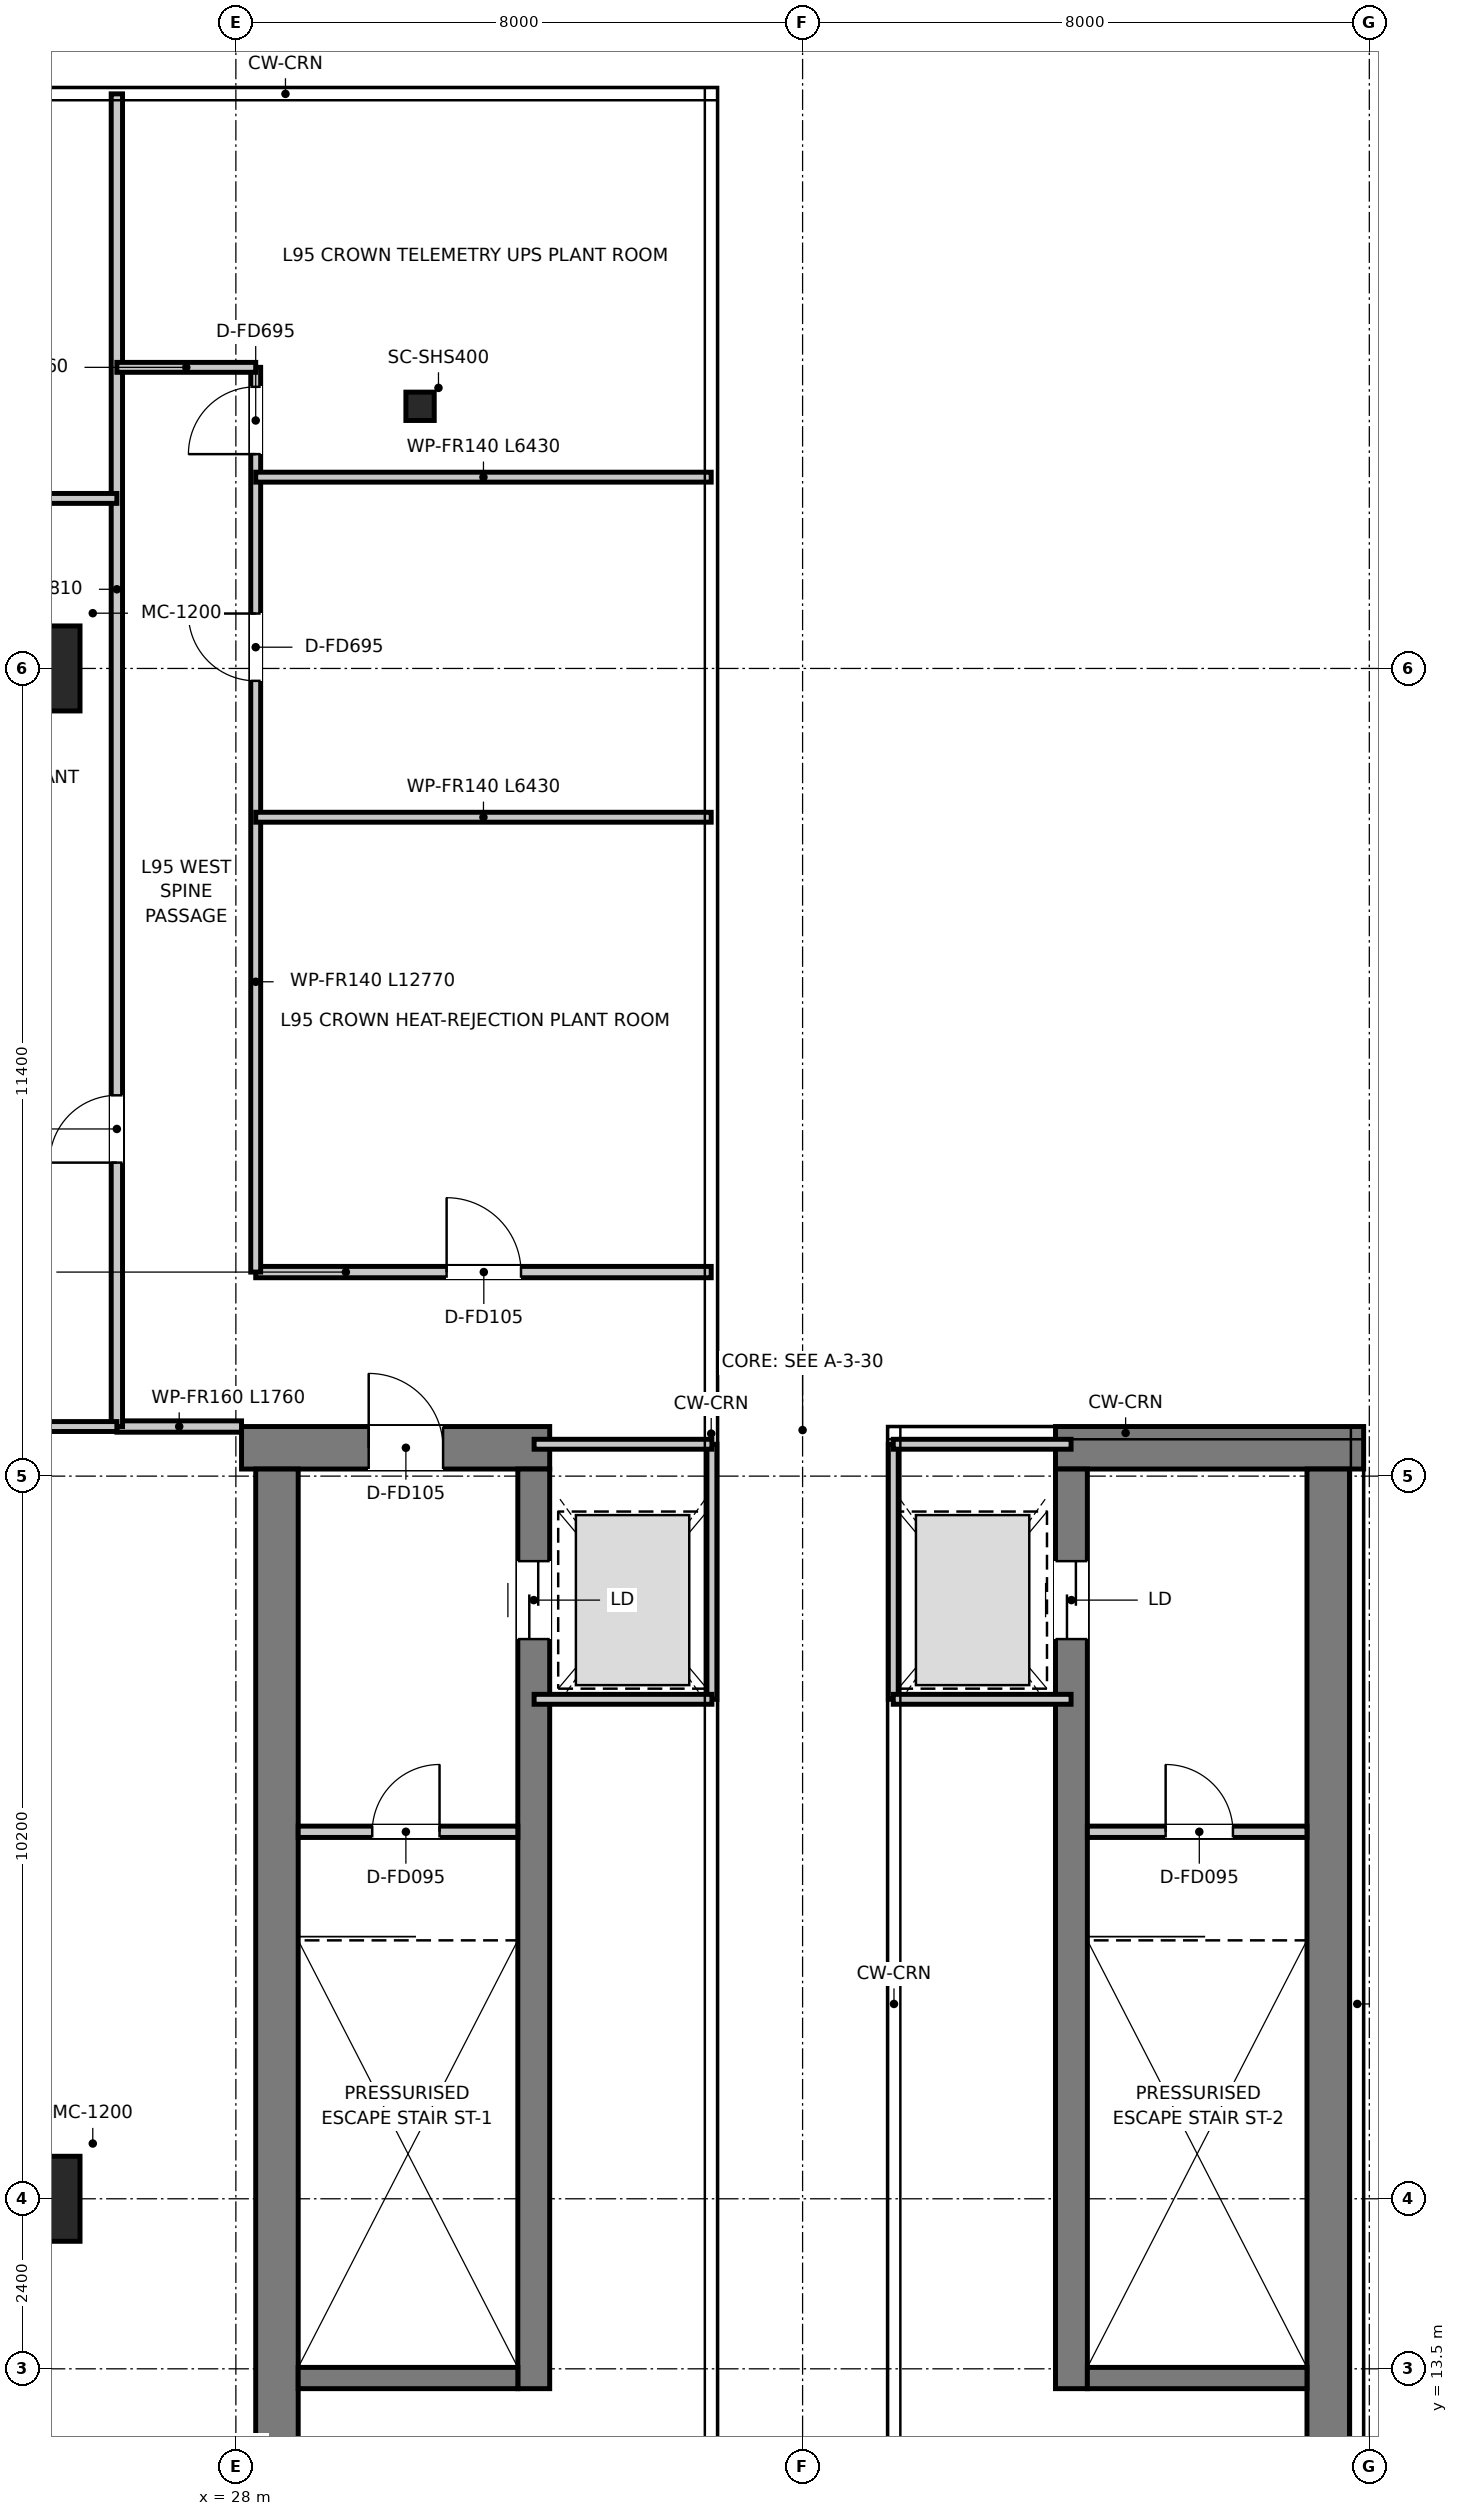
"""IFC4 building model, lengths in metres.
Left out: names, types, materials, properties, quantities, classifications, styles, units other than length and angle.
Written with IfcOpenShell. Run it as: python <this file> out.ifc"""

import sys

from ifc_helpers import new_model, si_unit, direction, frame, frame_2d, origin, origin_2d, place, context, subcontext, project, spatial, rectangle, hollow_rectangle, extrude, source, transform, mapped, element, fill, save


model = new_model("IFC4")
c1 = context("Model", 3, precision=1e-05, world=origin(), true_north=direction((0.0, 1.0)))
c2 = subcontext(c1, "Body", "Model", "MODEL_VIEW")
j1 = project(units=[si_unit("LENGTHUNIT", "METRE"), si_unit("PLANEANGLEUNIT", "RADIAN")], contexts=[c1])
p1 = place(None, origin())
s1 = spatial("IfcSite", under=j1, at=p1, CompositionType="ELEMENT")
p2 = place(p1, origin())
s2 = spatial("IfcBuilding", under=s1, at=p2, CompositionType="ELEMENT")
p3 = place(p2, frame((0.0, 0.0, 385.45)))
s3 = spatial("IfcBuildingStorey", under=s2, at=p3, CompositionType="ELEMENT", Elevation=385.45)
p4 = place(p3, frame((28.08, 26.5, 0.0), z_axis=(0.0, 0.0, 1.0), x_axis=(1.0, 0.0, 0.0)))
e1 = element("IfcWall", 1, at=p4, inside=s3, PredefinedType="SHEAR", context=c2, shape_type="SweptSolid", body=[
    extrude(rectangle(XDim=4.35, YDim=0.6, at=frame_2d((2.175, 0.0))), origin(), (0.0, 0.0, 1.0), 3.55),
])
p5 = place(p4, frame((1.795, 0.0, 0.0)))
e2 = element("IfcOpeningElement", 2, at=p5, cuts=e1, PredefinedType="OPENING", context=c2, shape_type="SweptSolid", body=[
    extrude(rectangle(XDim=1.05, YDim=2.1, at=frame_2d((0.525, 1.05))), frame((0.0, 0.31, 0.0), z_axis=(0.0, -1.0, 0.0), x_axis=(1.0, 0.0, 0.0)), (0.0, 0.0, 1.0), 0.62),
])
p6 = place(p3, frame((28.58, 11.1, 0.0), z_axis=(0.0, 0.0, 1.0), x_axis=(0.0, 1.0, 0.0)))
e3 = element("IfcWall", 3, at=p6, inside=s3, PredefinedType="SHEAR", context=c2, shape_type="SweptSolid", body=[
    extrude(rectangle(XDim=15.1, YDim=0.6, at=frame_2d((7.55, 0.0))), origin(), (0.0, 0.0, 1.0), 3.55),
])
p7 = place(p3, frame((32.205, 13.22, 0.0), z_axis=(0.0, 0.0, 1.0), x_axis=(0.0, 1.0, 0.0)))
e4 = element("IfcWall", 4, at=p7, inside=s3, PredefinedType="SHEAR", context=c2, shape_type="SweptSolid", body=[
    extrude(rectangle(XDim=12.98, YDim=0.45, at=frame_2d((6.49, 0.0))), origin(), (0.0, 0.0, 1.0), 3.55),
])
p8 = place(p7, frame((10.58, 0.0, 0.0)))
e5 = element("IfcOpeningElement", 5, at=p8, cuts=e4, PredefinedType="OPENING", context=c2, shape_type="SweptSolid", body=[
    extrude(rectangle(XDim=1.1, YDim=2.15, at=frame_2d((0.55, 1.075))), frame((0.0, 0.235, 0.0), z_axis=(0.0, -1.0, 0.0), x_axis=(1.0, 0.0, 0.0)), (0.0, 0.0, 1.0), 0.47),
])
p9 = place(p3, frame((28.88, 13.37, 0.0), z_axis=(0.0, 0.0, 1.0), x_axis=(1.0, 0.0, 0.0)))
e6 = element("IfcWall", 6, at=p9, inside=s3, PredefinedType="SHEAR", context=c2, shape_type="SweptSolid", body=[
    extrude(rectangle(XDim=3.1, YDim=0.3, at=frame_2d((1.55, 0.0))), origin(), (0.0, 0.0, 1.0), 3.55),
])
p10 = place(p3, frame((39.57, 26.5, 0.0), z_axis=(0.0, 0.0, 1.0), x_axis=(1.0, 0.0, 0.0)))
e7 = element("IfcWall", 7, at=p10, inside=s3, PredefinedType="SHEAR", context=c2, shape_type="SweptSolid", body=[
    extrude(rectangle(XDim=4.35, YDim=0.6, at=frame_2d((2.175, 0.0))), origin(), (0.0, 0.0, 1.0), 3.55),
])
p11 = place(p3, frame((39.795, 13.22, 0.0), z_axis=(0.0, 0.0, 1.0), x_axis=(0.0, 1.0, 0.0)))
e8 = element("IfcWall", 8, at=p11, inside=s3, PredefinedType="SHEAR", context=c2, shape_type="SweptSolid", body=[
    extrude(rectangle(XDim=12.98, YDim=0.45, at=frame_2d((6.49, 0.0))), origin(), (0.0, 0.0, 1.0), 3.55),
])
p12 = place(p11, frame((10.58, 0.0, 0.0)))
e9 = element("IfcOpeningElement", 9, at=p12, cuts=e8, PredefinedType="OPENING", context=c2, shape_type="SweptSolid", body=[
    extrude(rectangle(XDim=1.1, YDim=2.15, at=frame_2d((0.55, 1.075))), frame((0.0, 0.235, 0.0), z_axis=(0.0, -1.0, 0.0), x_axis=(1.0, 0.0, 0.0)), (0.0, 0.0, 1.0), 0.47),
])
p13 = place(p3, frame((43.42, 11.1, 0.0), z_axis=(0.0, 0.0, 1.0), x_axis=(0.0, 1.0, 0.0)))
e10 = element("IfcWall", 10, at=p13, inside=s3, PredefinedType="SHEAR", context=c2, shape_type="SweptSolid", body=[
    extrude(rectangle(XDim=15.1, YDim=0.6, at=frame_2d((7.55, 0.0))), origin(), (0.0, 0.0, 1.0), 3.55),
])
p14 = place(p3, frame((40.02, 13.37, 0.0), z_axis=(0.0, 0.0, 1.0), x_axis=(1.0, 0.0, 0.0)))
e11 = element("IfcWall", 11, at=p14, inside=s3, PredefinedType="SHEAR", context=c2, shape_type="SweptSolid", body=[
    extrude(rectangle(XDim=3.1, YDim=0.3, at=frame_2d((1.55, 0.0))), origin(), (0.0, 0.0, 1.0), 3.55),
])
m1 = source(origin(), c2, "Body", "SweptSolid", [
    extrude(rectangle(XDim=1.2, YDim=1.2, at=origin_2d()), origin(), (0.0, 0.0, 1.0), 3.55),
])
for number, where, z_axis, x_axis in (
    (12, (25.2, 15.9, 0.0), (0.0, 0.0, 1.0), (1.0, 0.0, 0.0)),
    (13, (25.2, 37.5, 0.0), (0.0, 0.0, 1.0), (1.0, 0.0, 0.0)),
):
    element("IfcColumn", number, at=place(p3, frame(where, z_axis=z_axis, x_axis=x_axis)), inside=s3, PredefinedType="USERDEFINED", context=c2, shape_type="MappedRepresentation", body=[
        mapped(m1, transform((0.0, 0.0, 0.0), x_axis=(1.0, 0.0, 0.0), y_axis=(0.0, 1.0, 0.0), z_axis=(0.0, 0.0, 1.0), scale=1.0)),
    ])
m2 = source(origin(), c2, "Body", "SweptSolid", [
    extrude(hollow_rectangle(XDim=0.4, YDim=0.4, WallThickness=0.025, at=origin_2d()), origin(), (0.0, 0.0, 1.0), 3.55),
])
p15 = place(p3, frame((30.6, 41.2, 0.0), z_axis=(0.0, 0.0, 1.0), x_axis=(1.0, 0.0, 0.0)))
e14 = element("IfcColumn", 14, at=p15, inside=s3, PredefinedType="COLUMN", context=c2, shape_type="MappedRepresentation", body=[
    mapped(m2, transform((0.0, 0.0, 0.0), x_axis=(1.0, 0.0, 0.0), y_axis=(0.0, 1.0, 0.0), z_axis=(0.0, 0.0, 1.0), scale=1.0)),
])
p16 = place(p3, frame((28.88, 21.08, 0.0), z_axis=(0.0, 0.0, 1.0), x_axis=(1.0, 0.0, 0.0)))
e15 = element("IfcWall", 15, at=p16, inside=s3, PredefinedType="PARTITIONING", context=c2, shape_type="SweptSolid", body=[
    extrude(rectangle(XDim=3.1, YDim=0.16, at=frame_2d((1.55, 0.0))), origin(), (0.0, 0.0, 1.0), 3.25),
])
p17 = place(p16, frame((1.045, 0.0, 0.0)))
e16 = element("IfcOpeningElement", 16, at=p17, cuts=e15, PredefinedType="OPENING", context=c2, shape_type="SweptSolid", body=[
    extrude(rectangle(XDim=0.95, YDim=2.1, at=frame_2d((0.475, 1.05))), frame((0.0, 0.09, 0.0), z_axis=(0.0, -1.0, 0.0), x_axis=(1.0, 0.0, 0.0)), (0.0, 0.0, 1.0), 0.18),
])
p18 = place(p3, frame((34.72, 22.95, 0.0), z_axis=(0.0, 0.0, 1.0), x_axis=(0.0, 1.0, 0.0)))
e17 = element("IfcWall", 17, at=p18, inside=s3, PredefinedType="PARTITIONING", context=c2, shape_type="SweptSolid", body=[
    extrude(rectangle(XDim=3.6, YDim=0.14, at=frame_2d((1.8, 0.0))), origin(), (0.0, 0.0, 1.0), 3.25),
])
for number, where, z_axis, x_axis in (
    (18, (32.21, 22.95, 0.0), (0.0, 0.0, 1.0), (1.0, 0.0, 0.0)),
    (19, (32.21, 26.55, 0.0), (0.0, 0.0, 1.0), (1.0, 0.0, 0.0)),
):
    element("IfcWall", number, at=place(p3, frame(where, z_axis=z_axis, x_axis=x_axis)), inside=s3, PredefinedType="PARTITIONING", context=c2, shape_type="SweptSolid", body=[
        extrude(rectangle(XDim=2.51, YDim=0.14, at=frame_2d((1.255, 0.0))), origin(), (0.0, 0.0, 1.0), 3.25),
    ])
p19 = place(p3, frame((40.02, 21.08, 0.0), z_axis=(0.0, 0.0, 1.0), x_axis=(1.0, 0.0, 0.0)))
e20 = element("IfcWall", 20, at=p19, inside=s3, PredefinedType="PARTITIONING", context=c2, shape_type="SweptSolid", body=[
    extrude(rectangle(XDim=3.1, YDim=0.16, at=frame_2d((1.55, 0.0))), origin(), (0.0, 0.0, 1.0), 3.25),
])
p20 = place(p19, frame((1.105, 0.0, 0.0)))
e21 = element("IfcOpeningElement", 21, at=p20, cuts=e20, PredefinedType="OPENING", context=c2, shape_type="SweptSolid", body=[
    extrude(rectangle(XDim=0.95, YDim=2.1, at=frame_2d((0.475, 1.05))), frame((0.0, 0.09, 0.0), z_axis=(0.0, -1.0, 0.0), x_axis=(1.0, 0.0, 0.0)), (0.0, 0.0, 1.0), 0.18),
])
p21 = place(p3, frame((37.28, 22.95, 0.0), z_axis=(0.0, 0.0, 1.0), x_axis=(0.0, 1.0, 0.0)))
e22 = element("IfcWall", 22, at=p21, inside=s3, PredefinedType="PARTITIONING", context=c2, shape_type="SweptSolid", body=[
    extrude(rectangle(XDim=3.6, YDim=0.14, at=frame_2d((1.8, 0.0))), origin(), (0.0, 0.0, 1.0), 3.25),
])
for number, where, z_axis, x_axis in (
    (23, (37.28, 22.95, 0.0), (0.0, 0.0, 1.0), (1.0, 0.0, 0.0)),
    (24, (37.28, 26.55, 0.0), (0.0, 0.0, 1.0), (1.0, 0.0, 0.0)),
):
    element("IfcWall", number, at=place(p3, frame(where, z_axis=z_axis, x_axis=x_axis)), inside=s3, PredefinedType="PARTITIONING", context=c2, shape_type="SweptSolid", body=[
        extrude(rectangle(XDim=2.51, YDim=0.14, at=frame_2d((1.255, 0.0))), origin(), (0.0, 0.0, 1.0), 3.25),
    ])
p22 = place(p3, frame((28.28, 28.98, 0.0), z_axis=(0.0, 0.0, 1.0), x_axis=(1.0, 0.0, 0.0)))
e25 = element("IfcWall", 25, at=p22, inside=s3, PredefinedType="PARTITIONING", context=c2, shape_type="SweptSolid", body=[
    extrude(rectangle(XDim=6.43, YDim=0.16, at=frame_2d((3.215, 0.0))), origin(), (0.0, 0.0, 1.0), 2.76),
])
p23 = place(p22, frame((2.695, 0.0, 0.0)))
e26 = element("IfcOpeningElement", 26, at=p23, cuts=e25, PredefinedType="OPENING", context=c2, shape_type="SweptSolid", body=[
    extrude(rectangle(XDim=1.05, YDim=2.1, at=frame_2d((0.525, 1.05))), frame((0.0, 0.09, 0.0), z_axis=(0.0, -1.0, 0.0), x_axis=(1.0, 0.0, 0.0)), (0.0, 0.0, 1.0), 0.18),
])
p24 = place(p3, frame((26.32, 26.8, 0.0), z_axis=(0.0, 0.0, 1.0), x_axis=(1.0, 0.0, 0.0)))
e27 = element("IfcWall", 27, at=p24, inside=s3, PredefinedType="PARTITIONING", context=c2, shape_type="SweptSolid", body=[
    extrude(rectangle(XDim=1.76, YDim=0.16, at=frame_2d((0.88, 0.0))), origin(), (0.0, 0.0, 1.0), 3.25),
])
p25 = place(p3, frame((26.32, 26.8, 0.0), z_axis=(0.0, 0.0, 1.0), x_axis=(0.0, 1.0, 0.0)))
e28 = element("IfcWall", 28, at=p25, inside=s3, PredefinedType="PARTITIONING", context=c2, shape_type="SweptSolid", body=[
    extrude(rectangle(XDim=18.81, YDim=0.16, at=frame_2d((9.405, 0.0))), origin(), (0.0, 0.0, 1.0), 2.76),
])
p26 = place(p25, frame((3.725, 0.0, 0.0)))
e29 = element("IfcOpeningElement", 29, at=p26, cuts=e28, PredefinedType="OPENING", context=c2, shape_type="SweptSolid", body=[
    extrude(rectangle(XDim=0.95, YDim=2.1, at=frame_2d((0.475, 1.05))), frame((0.0, 0.09, 0.0), z_axis=(0.0, -1.0, 0.0), x_axis=(1.0, 0.0, 0.0)), (0.0, 0.0, 1.0), 0.18),
])
p27 = place(p3, frame((21.45, 26.8, 0.0), z_axis=(0.0, 0.0, 1.0), x_axis=(1.0, 0.0, 0.0)))
e30 = element("IfcWall", 30, at=p27, inside=s3, PredefinedType="PARTITIONING", context=c2, shape_type="SweptSolid", body=[
    extrude(rectangle(XDim=4.87, YDim=0.14, at=frame_2d((2.435, 0.0))), origin(), (0.0, 0.0, 1.0), 2.76),
])
p28 = place(p3, frame((21.45, 39.9, 0.0), z_axis=(0.0, 0.0, 1.0), x_axis=(1.0, 0.0, 0.0)))
e31 = element("IfcWall", 31, at=p28, inside=s3, PredefinedType="PARTITIONING", context=c2, shape_type="SweptSolid", body=[
    extrude(rectangle(XDim=4.87, YDim=0.14, at=frame_2d((2.435, 0.0))), origin(), (0.0, 0.0, 1.0), 3.25),
])
p29 = place(p3, frame((28.28, 28.98, 0.0), z_axis=(0.0, 0.0, 1.0), x_axis=(0.0, 1.0, 0.0)))
e32 = element("IfcWall", 32, at=p29, inside=s3, PredefinedType="PARTITIONING", context=c2, shape_type="SweptSolid", body=[
    extrude(rectangle(XDim=12.77, YDim=0.14, at=frame_2d((6.385, 0.0))), origin(), (0.0, 0.0, 1.0), 2.76),
])
p30 = place(p29, frame((8.345, 0.0, 0.0)))
e33 = element("IfcOpeningElement", 33, at=p30, cuts=e32, PredefinedType="OPENING", context=c2, shape_type="SweptSolid", body=[
    extrude(rectangle(XDim=0.95, YDim=2.1, at=frame_2d((0.475, 1.05))), frame((0.0, 0.08, 0.0), z_axis=(0.0, -1.0, 0.0), x_axis=(1.0, 0.0, 0.0)), (0.0, 0.0, 1.0), 0.16),
])
p31 = place(p29, frame((11.545, 0.0, 0.0)))
e34 = element("IfcOpeningElement", 34, at=p31, cuts=e32, PredefinedType="OPENING", context=c2, shape_type="SweptSolid", body=[
    extrude(rectangle(XDim=0.95, YDim=2.1, at=frame_2d((0.475, 1.05))), frame((0.0, 0.08, 0.0), z_axis=(0.0, -1.0, 0.0), x_axis=(1.0, 0.0, 0.0)), (0.0, 0.0, 1.0), 0.16),
])
for number, where, z_axis, x_axis in (
    (35, (28.28, 35.4, 0.0), (0.0, 0.0, 1.0), (1.0, 0.0, 0.0)),
    (36, (28.28, 40.2, 0.0), (0.0, 0.0, 1.0), (1.0, 0.0, 0.0)),
):
    element("IfcWall", number, at=place(p3, frame(where, z_axis=z_axis, x_axis=x_axis)), inside=s3, PredefinedType="PARTITIONING", context=c2, shape_type="SweptSolid", body=[
        extrude(rectangle(XDim=6.43, YDim=0.14, at=frame_2d((3.215, 0.0))), origin(), (0.0, 0.0, 1.0), 2.76),
    ])
p32 = place(p3, frame((26.32, 41.75, 0.0), z_axis=(0.0, 0.0, 1.0), x_axis=(1.0, 0.0, 0.0)))
e37 = element("IfcWall", 37, at=p32, inside=s3, PredefinedType="PARTITIONING", context=c2, shape_type="SweptSolid", body=[
    extrude(rectangle(XDim=1.96, YDim=0.14, at=frame_2d((0.98, 0.0))), origin(), (0.0, 0.0, 1.0), 3.25),
])
p33 = place(p17, origin())
e38 = element("IfcDoor", 38, at=p33, inside=s3, OperationType="SINGLE_SWING_RIGHT", PredefinedType="DOOR", context=c2, shape_type="SweptSolid", body=[
    extrude(rectangle(XDim=0.95, YDim=2.1, at=frame_2d((0.475, 1.05))), frame((0.0, 0.025, 0.0), z_axis=(0.0, -1.0, 0.0), x_axis=(1.0, 0.0, 0.0)), (0.0, 0.0, 1.0), 0.05),
])
fill(e16, e38)
p34 = place(p8, origin())
e39 = element("IfcDoor", 39, at=p34, inside=s3, OperationType="DOUBLE_DOOR_SLIDING", PredefinedType="DOOR", context=c2, shape_type="SweptSolid", body=[
    extrude(rectangle(XDim=1.1, YDim=2.15, at=frame_2d((0.55, 1.075))), frame((0.0, 0.025, 0.0), z_axis=(0.0, -1.0, 0.0), x_axis=(1.0, 0.0, 0.0)), (0.0, 0.0, 1.0), 0.05),
])
fill(e5, e39)
p35 = place(p5, origin())
e40 = element("IfcDoor", 40, at=p35, inside=s3, OperationType="SINGLE_SWING_LEFT", PredefinedType="DOOR", context=c2, shape_type="SweptSolid", body=[
    extrude(rectangle(XDim=1.05, YDim=2.1, at=frame_2d((0.525, 1.05))), frame((0.0, 0.025, 0.0), z_axis=(0.0, -1.0, 0.0), x_axis=(1.0, 0.0, 0.0)), (0.0, 0.0, 1.0), 0.05),
])
fill(e2, e40)
p36 = place(p20, origin())
e41 = element("IfcDoor", 41, at=p36, inside=s3, OperationType="SINGLE_SWING_LEFT", PredefinedType="DOOR", context=c2, shape_type="SweptSolid", body=[
    extrude(rectangle(XDim=0.95, YDim=2.1, at=frame_2d((0.475, 1.05))), frame((0.0, 0.025, 0.0), z_axis=(0.0, -1.0, 0.0), x_axis=(1.0, 0.0, 0.0)), (0.0, 0.0, 1.0), 0.05),
])
fill(e21, e41)
p37 = place(p12, origin())
e42 = element("IfcDoor", 42, at=p37, inside=s3, OperationType="DOUBLE_DOOR_SLIDING", PredefinedType="DOOR", context=c2, shape_type="SweptSolid", body=[
    extrude(rectangle(XDim=1.1, YDim=2.15, at=frame_2d((0.55, 1.075))), frame((0.0, 0.025, 0.0), z_axis=(0.0, -1.0, 0.0), x_axis=(1.0, 0.0, 0.0)), (0.0, 0.0, 1.0), 0.05),
])
fill(e9, e42)
p38 = place(p23, origin())
e43 = element("IfcDoor", 43, at=p38, inside=s3, OperationType="SINGLE_SWING_LEFT", PredefinedType="DOOR", context=c2, shape_type="SweptSolid", body=[
    extrude(rectangle(XDim=1.05, YDim=2.1, at=frame_2d((0.525, 1.05))), frame((0.0, 0.025, 0.0), z_axis=(0.0, -1.0, 0.0), x_axis=(1.0, 0.0, 0.0)), (0.0, 0.0, 1.0), 0.05),
])
fill(e26, e43)
p39 = place(p30, origin())
e44 = element("IfcDoor", 44, at=p39, inside=s3, OperationType="SINGLE_SWING_RIGHT", PredefinedType="DOOR", context=c2, shape_type="SweptSolid", body=[
    extrude(rectangle(XDim=0.95, YDim=2.1, at=frame_2d((0.475, 1.05))), frame((0.0, 0.025, 0.0), z_axis=(0.0, -1.0, 0.0), x_axis=(1.0, 0.0, 0.0)), (0.0, 0.0, 1.0), 0.05),
])
fill(e33, e44)
p40 = place(p31, origin())
e45 = element("IfcDoor", 45, at=p40, inside=s3, OperationType="SINGLE_SWING_LEFT", PredefinedType="DOOR", context=c2, shape_type="SweptSolid", body=[
    extrude(rectangle(XDim=0.95, YDim=2.1, at=frame_2d((0.475, 1.05))), frame((0.0, 0.025, 0.0), z_axis=(0.0, -1.0, 0.0), x_axis=(1.0, 0.0, 0.0)), (0.0, 0.0, 1.0), 0.05),
])
fill(e34, e45)
p41 = place(p26, origin())
e46 = element("IfcDoor", 46, at=p41, inside=s3, OperationType="SINGLE_SWING_LEFT", PredefinedType="DOOR", context=c2, shape_type="SweptSolid", body=[
    extrude(rectangle(XDim=0.95, YDim=2.1, at=frame_2d((0.475, 1.05))), frame((0.0, 0.025, 0.0), z_axis=(0.0, -1.0, 0.0), x_axis=(1.0, 0.0, 0.0)), (0.0, 0.0, 1.0), 0.05),
])
fill(e29, e46)
save(model, sys.argv[1])
